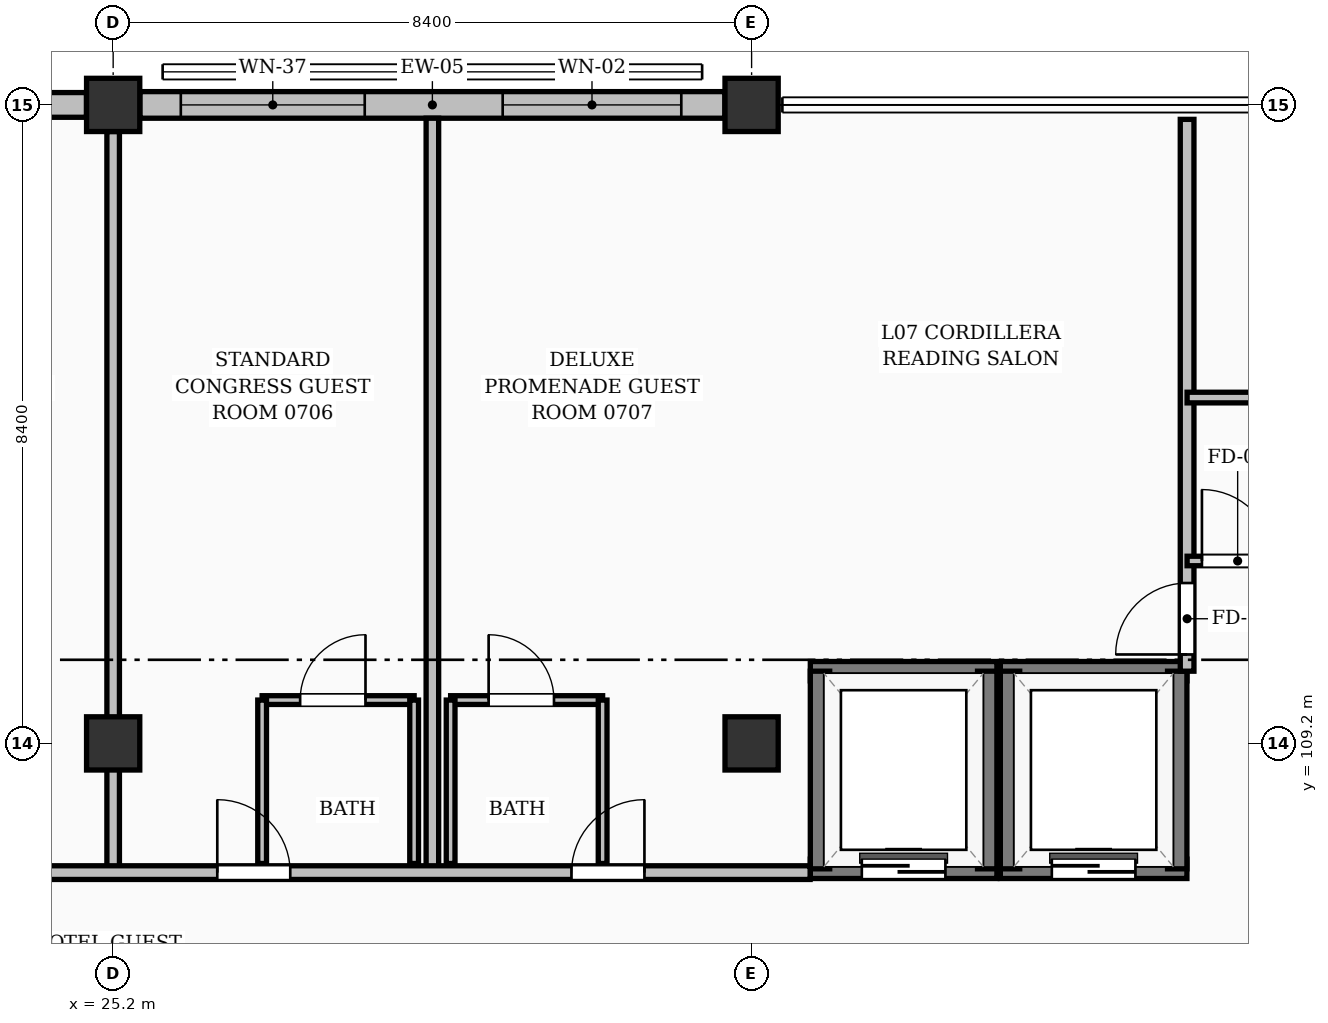
"""IFC4 building model, lengths in metres.
Left out: names, types, materials, properties, quantities, classifications, styles, units other than length and angle.
Written with IfcOpenShell. Run it as: python <this file> out.ifc"""

import sys

from ifc_helpers import new_model, si_unit, direction, frame, frame_2d, origin, origin_2d, place, context, subcontext, project, spatial, rectangle, extrude, element, fill, save


model = new_model("IFC4")
c1 = context("Model", 3, precision=1e-05, world=origin(), true_north=direction((0.0, 1.0)))
c2 = subcontext(c1, "Body", "Model", "MODEL_VIEW")
j1 = project(units=[si_unit("LENGTHUNIT", "METRE"), si_unit("PLANEANGLEUNIT", "RADIAN")], contexts=[c1])
p1 = place(None, origin())
s1 = spatial("IfcSite", under=j1, at=p1, CompositionType="ELEMENT")
p2 = place(p1, origin())
s2 = spatial("IfcBuilding", under=s1, at=p2, CompositionType="ELEMENT")
p3 = place(p2, frame((0.0, 0.0, 25.2)))
s3 = spatial("IfcBuildingStorey", under=s2, at=p3, CompositionType="ELEMENT", Elevation=25.2)
for number, where, z_axis, x_axis in (
    (1, (25.2, 109.2, 0.0), (0.0, 0.0, 1.0), (1.0, 0.0, 0.0)),
    (2, (25.2, 117.6, 0.0), (0.0, 0.0, 1.0), (1.0, 0.0, 0.0)),
    (3, (33.6, 109.2, 0.0), (0.0, 0.0, 1.0), (1.0, 0.0, 0.0)),
    (4, (33.6, 117.6, 0.0), (0.0, 0.0, 1.0), (1.0, 0.0, 0.0)),
):
    element("IfcColumn", number, at=place(p3, frame(where, z_axis=z_axis, x_axis=x_axis)), inside=s3, PredefinedType="COLUMN", context=c2, shape_type="SweptSolid", body=[
        extrude(rectangle(XDim=0.7, YDim=0.7, at=origin_2d()), origin(), (0.0, 0.0, 1.0), 3.36),
    ])
p4 = place(p3, frame((17.151, 117.6, 0.0), z_axis=(0.0, 0.0, 1.0), x_axis=(1.0, 0.0, 0.0)))
e5 = element("IfcWall", 5, at=p4, inside=s3, PredefinedType="SOLIDWALL", context=c2, shape_type="SweptSolid", body=[
    extrude(rectangle(XDim=7.698, YDim=0.325, at=frame_2d((3.849, 0.0))), origin(), (0.0, 0.0, 1.0), 2.414),
])
p5 = place(p4, frame((0.924, 0.0, 0.0)))
e6 = element("IfcOpeningElement", 6, at=p5, cuts=e5, PredefinedType="OPENING", context=c2, shape_type="SweptSolid", body=[
    extrude(rectangle(XDim=1.75, YDim=2.08, at=frame_2d((0.875, 1.04))), frame((0.0, 0.172, 0.0), z_axis=(0.0, -1.0, 0.0), x_axis=(1.0, 0.0, 0.0)), (0.0, 0.0, 1.0), 0.345),
])
p6 = place(p4, frame((4.639, 0.0, 0.25)))
e7 = element("IfcOpeningElement", 7, at=p6, cuts=e5, PredefinedType="OPENING", context=c2, shape_type="SweptSolid", body=[
    extrude(rectangle(XDim=2.32, YDim=1.9, at=frame_2d((1.16, 0.95))), frame((0.0, 0.172, 0.0), z_axis=(0.0, -1.0, 0.0), x_axis=(1.0, 0.0, 0.0)), (0.0, 0.0, 1.0), 0.345),
])
p7 = place(p3, frame((25.551, 117.6, 0.0), z_axis=(0.0, 0.0, 1.0), x_axis=(1.0, 0.0, 0.0)))
e8 = element("IfcWall", 8, at=p7, inside=s3, PredefinedType="SOLIDWALL", context=c2, shape_type="SweptSolid", body=[
    extrude(rectangle(XDim=7.698, YDim=0.35, at=frame_2d((3.849, 0.0))), origin(), (0.0, 0.0, 1.0), 2.414),
])
p8 = place(p7, frame((0.539, 0.0, 0.25)))
e9 = element("IfcOpeningElement", 9, at=p8, cuts=e8, PredefinedType="OPENING", context=c2, shape_type="SweptSolid", body=[
    extrude(rectangle(XDim=2.42, YDim=1.9, at=frame_2d((1.21, 0.95))), frame((0.0, 0.185, 0.0), z_axis=(0.0, -1.0, 0.0), x_axis=(1.0, 0.0, 0.0)), (0.0, 0.0, 1.0), 0.37),
])
p9 = place(p7, frame((4.774, 0.0, 0.25)))
e10 = element("IfcOpeningElement", 10, at=p9, cuts=e8, PredefinedType="OPENING", context=c2, shape_type="SweptSolid", body=[
    extrude(rectangle(XDim=2.35, YDim=1.85, at=frame_2d((1.175, 0.925))), frame((0.0, 0.185, 0.0), z_axis=(0.0, -1.0, 0.0), x_axis=(1.0, 0.0, 0.0)), (0.0, 0.0, 1.0), 0.37),
])
p10 = place(p3, frame((34.373, 107.55, 0.0), z_axis=(0.0, 0.0, 1.0), x_axis=(1.0, 0.0, 0.0)))
e11 = element("IfcWall", 11, at=p10, inside=s3, PredefinedType="SOLIDWALL", context=c2, shape_type="SweptSolid", body=[
    extrude(rectangle(XDim=2.455, YDim=0.255, at=frame_2d((1.228, 0.0))), origin(), (0.0, 0.0, 1.0), 3.12),
])
p11 = place(p10, frame((0.677, 0.0, 0.0)))
e12 = element("IfcOpeningElement", 12, at=p11, cuts=e11, PredefinedType="OPENING", context=c2, shape_type="SweptSolid", body=[
    extrude(rectangle(XDim=1.1, YDim=2.15, at=frame_2d((0.55, 1.075))), frame((0.0, 0.137, 0.0), z_axis=(0.0, -1.0, 0.0), x_axis=(1.0, 0.0, 0.0)), (0.0, 0.0, 1.0), 0.275),
])
p12 = place(p3, frame((34.373, 110.15, 0.0), z_axis=(0.0, 0.0, 1.0), x_axis=(1.0, 0.0, 0.0)))
e13 = element("IfcWall", 13, at=p12, inside=s3, PredefinedType="SOLIDWALL", context=c2, shape_type="SweptSolid", body=[
    extrude(rectangle(XDim=2.455, YDim=0.255, at=frame_2d((1.228, 0.0))), origin(), (0.0, 0.0, 1.0), 3.12),
])
for number, where, z_axis, x_axis in (
    (14, (34.5, 107.55, 0.0), (0.0, 0.0, 1.0), (0.0, 1.0, 0.0)),
    (15, (36.7, 107.55, 0.0), (0.0, 0.0, 1.0), (0.0, 1.0, 0.0)),
):
    element("IfcWall", number, at=place(p3, frame(where, z_axis=z_axis, x_axis=x_axis)), inside=s3, PredefinedType="SOLIDWALL", context=c2, shape_type="SweptSolid", body=[
        extrude(rectangle(XDim=2.6, YDim=0.255, at=frame_2d((1.3, 0.0))), origin(), (0.0, 0.0, 1.0), 3.12),
    ])
p13 = place(p3, frame((36.873, 107.55, 0.0), z_axis=(0.0, 0.0, 1.0), x_axis=(1.0, 0.0, 0.0)))
e16 = element("IfcWall", 16, at=p13, inside=s3, PredefinedType="SOLIDWALL", context=c2, shape_type="SweptSolid", body=[
    extrude(rectangle(XDim=2.455, YDim=0.255, at=frame_2d((1.228, 0.0))), origin(), (0.0, 0.0, 1.0), 3.12),
])
p14 = place(p13, frame((0.677, 0.0, 0.0)))
e17 = element("IfcOpeningElement", 17, at=p14, cuts=e16, PredefinedType="OPENING", context=c2, shape_type="SweptSolid", body=[
    extrude(rectangle(XDim=1.1, YDim=2.15, at=frame_2d((0.55, 1.075))), frame((0.0, 0.137, 0.0), z_axis=(0.0, -1.0, 0.0), x_axis=(1.0, 0.0, 0.0)), (0.0, 0.0, 1.0), 0.275),
])
p15 = place(p3, frame((36.873, 110.15, 0.0), z_axis=(0.0, 0.0, 1.0), x_axis=(1.0, 0.0, 0.0)))
e18 = element("IfcWall", 18, at=p15, inside=s3, PredefinedType="SOLIDWALL", context=c2, shape_type="SweptSolid", body=[
    extrude(rectangle(XDim=2.455, YDim=0.255, at=frame_2d((1.228, 0.0))), origin(), (0.0, 0.0, 1.0), 3.12),
])
for number, where, z_axis, x_axis in (
    (19, (37.0, 107.55, 0.0), (0.0, 0.0, 1.0), (0.0, 1.0, 0.0)),
    (20, (39.2, 107.55, 0.0), (0.0, 0.0, 1.0), (0.0, 1.0, 0.0)),
):
    element("IfcWall", number, at=place(p3, frame(where, z_axis=z_axis, x_axis=x_axis)), inside=s3, PredefinedType="SOLIDWALL", context=c2, shape_type="SweptSolid", body=[
        extrude(rectangle(XDim=2.6, YDim=0.255, at=frame_2d((1.3, 0.0))), origin(), (0.0, 0.0, 1.0), 3.12),
    ])
p16 = place(p3, frame((27.16, 109.77, 0.0), z_axis=(0.0, 0.0, 1.0), x_axis=(1.0, 0.0, 0.0)))
e21 = element("IfcWall", 21, at=p16, inside=s3, PredefinedType="PARTITIONING", context=c2, shape_type="SweptSolid", body=[
    extrude(rectangle(XDim=2.0, YDim=0.115, at=frame_2d((1.0, 0.0))), origin(), (0.0, 0.0, 1.0), 3.12),
])
p17 = place(p16, frame((0.5, 0.0, 0.0)))
e22 = element("IfcOpeningElement", 22, at=p17, cuts=e21, PredefinedType="OPENING", context=c2, shape_type="SweptSolid", body=[
    extrude(rectangle(XDim=0.86, YDim=2.05, at=frame_2d((0.43, 1.025))), frame((0.0, 0.067, 0.0), z_axis=(0.0, -1.0, 0.0), x_axis=(1.0, 0.0, 0.0)), (0.0, 0.0, 1.0), 0.135),
])
for number, where, z_axis, x_axis in (
    (23, (27.16, 107.62, 0.0), (0.0, 0.0, 1.0), (0.0, 1.0, 0.0)),
    (24, (29.16, 107.62, 0.0), (0.0, 0.0, 1.0), (0.0, 1.0, 0.0)),
):
    element("IfcWall", number, at=place(p3, frame(where, z_axis=z_axis, x_axis=x_axis)), inside=s3, PredefinedType="PARTITIONING", context=c2, shape_type="SweptSolid", body=[
        extrude(rectangle(XDim=2.15, YDim=0.115, at=frame_2d((1.075, 0.0))), origin(), (0.0, 0.0, 1.0), 3.12),
    ])
p18 = place(p3, frame((29.64, 109.77, 0.0), z_axis=(0.0, 0.0, 1.0), x_axis=(1.0, 0.0, 0.0)))
e25 = element("IfcWall", 25, at=p18, inside=s3, PredefinedType="PARTITIONING", context=c2, shape_type="SweptSolid", body=[
    extrude(rectangle(XDim=2.0, YDim=0.115, at=frame_2d((1.0, 0.0))), origin(), (0.0, 0.0, 1.0), 3.12),
])
p19 = place(p18, frame((0.5, 0.0, 0.0)))
e26 = element("IfcOpeningElement", 26, at=p19, cuts=e25, PredefinedType="OPENING", context=c2, shape_type="SweptSolid", body=[
    extrude(rectangle(XDim=0.86, YDim=2.05, at=frame_2d((0.43, 1.025))), frame((0.0, 0.067, 0.0), z_axis=(0.0, -1.0, 0.0), x_axis=(1.0, 0.0, 0.0)), (0.0, 0.0, 1.0), 0.135),
])
for number, where, z_axis, x_axis in (
    (27, (29.64, 107.62, 0.0), (0.0, 0.0, 1.0), (0.0, 1.0, 0.0)),
    (28, (31.64, 107.62, 0.0), (0.0, 0.0, 1.0), (0.0, 1.0, 0.0)),
):
    element("IfcWall", number, at=place(p3, frame(where, z_axis=z_axis, x_axis=x_axis)), inside=s3, PredefinedType="PARTITIONING", context=c2, shape_type="SweptSolid", body=[
        extrude(rectangle(XDim=2.15, YDim=0.115, at=frame_2d((1.075, 0.0))), origin(), (0.0, 0.0, 1.0), 3.12),
    ])
p20 = place(p3, frame((29.4, 107.5, 0.0), z_axis=(0.0, 0.0, 1.0), x_axis=(0.0, 1.0, 0.0)))
e29 = element("IfcWall", 29, at=p20, inside=s3, PredefinedType="PARTITIONING", context=c2, shape_type="SweptSolid", body=[
    extrude(rectangle(XDim=9.925, YDim=0.165, at=frame_2d((4.962, 0.0))), origin(), (0.0, 0.0, 1.0), 3.12),
])
p21 = place(p3, frame((25.2, 107.5, 0.0), z_axis=(0.0, 0.0, 1.0), x_axis=(0.0, 1.0, 0.0)))
e30 = element("IfcWall", 30, at=p21, inside=s3, PredefinedType="PARTITIONING", context=c2, shape_type="SweptSolid", body=[
    extrude(rectangle(XDim=9.75, YDim=0.165, at=frame_2d((4.875, 0.0))), origin(), (0.0, 0.0, 1.0), 2.013),
])
p22 = place(p3, frame((0.15, 107.5, 0.0), z_axis=(0.0, 0.0, 1.0), x_axis=(1.0, 0.0, 0.0)))
e31 = element("IfcWall", 31, at=p22, inside=s3, PredefinedType="PARTITIONING", context=c2, shape_type="SweptSolid", body=[
    extrude(rectangle(XDim=34.22, YDim=0.18, at=frame_2d((17.11, 0.0))), origin(), (0.0, 0.0, 1.0), 3.12),
])
p23 = place(p22, frame((1.35, 0.0, 0.0)))
e32 = element("IfcOpeningElement", 32, at=p23, cuts=e31, PredefinedType="OPENING", context=c2, shape_type="SweptSolid", body=[
    extrude(rectangle(XDim=1.02, YDim=2.15, at=frame_2d((0.51, 1.075))), frame((0.0, 0.1, 0.0), z_axis=(0.0, -1.0, 0.0), x_axis=(1.0, 0.0, 0.0)), (0.0, 0.0, 1.0), 0.2),
])
p24 = place(p22, frame((9.62, 0.0, 0.0)))
e33 = element("IfcOpeningElement", 33, at=p24, cuts=e31, PredefinedType="OPENING", context=c2, shape_type="SweptSolid", body=[
    extrude(rectangle(XDim=0.96, YDim=2.15, at=frame_2d((0.48, 1.075))), frame((0.0, 0.1, 0.0), z_axis=(0.0, -1.0, 0.0), x_axis=(1.0, 0.0, 0.0)), (0.0, 0.0, 1.0), 0.2),
])
p25 = place(p22, frame((14.28, 0.0, 0.0)))
e34 = element("IfcOpeningElement", 34, at=p25, cuts=e31, PredefinedType="OPENING", context=c2, shape_type="SweptSolid", body=[
    extrude(rectangle(XDim=0.96, YDim=2.15, at=frame_2d((0.48, 1.075))), frame((0.0, 0.1, 0.0), z_axis=(0.0, -1.0, 0.0), x_axis=(1.0, 0.0, 0.0)), (0.0, 0.0, 1.0), 0.2),
])
p26 = place(p22, frame((18.02, 0.0, 0.0)))
e35 = element("IfcOpeningElement", 35, at=p26, cuts=e31, PredefinedType="OPENING", context=c2, shape_type="SweptSolid", body=[
    extrude(rectangle(XDim=0.96, YDim=2.15, at=frame_2d((0.48, 1.075))), frame((0.0, 0.1, 0.0), z_axis=(0.0, -1.0, 0.0), x_axis=(1.0, 0.0, 0.0)), (0.0, 0.0, 1.0), 0.2),
])
p27 = place(p22, frame((22.68, 0.0, 0.0)))
e36 = element("IfcOpeningElement", 36, at=p27, cuts=e31, PredefinedType="OPENING", context=c2, shape_type="SweptSolid", body=[
    extrude(rectangle(XDim=0.96, YDim=2.15, at=frame_2d((0.48, 1.075))), frame((0.0, 0.1, 0.0), z_axis=(0.0, -1.0, 0.0), x_axis=(1.0, 0.0, 0.0)), (0.0, 0.0, 1.0), 0.2),
])
p28 = place(p22, frame((26.42, 0.0, 0.0)))
e37 = element("IfcOpeningElement", 37, at=p28, cuts=e31, PredefinedType="OPENING", context=c2, shape_type="SweptSolid", body=[
    extrude(rectangle(XDim=0.96, YDim=2.15, at=frame_2d((0.48, 1.075))), frame((0.0, 0.1, 0.0), z_axis=(0.0, -1.0, 0.0), x_axis=(1.0, 0.0, 0.0)), (0.0, 0.0, 1.0), 0.2),
])
p29 = place(p22, frame((31.08, 0.0, 0.0)))
e38 = element("IfcOpeningElement", 38, at=p29, cuts=e31, PredefinedType="OPENING", context=c2, shape_type="SweptSolid", body=[
    extrude(rectangle(XDim=0.96, YDim=2.15, at=frame_2d((0.48, 1.075))), frame((0.0, 0.1, 0.0), z_axis=(0.0, -1.0, 0.0), x_axis=(1.0, 0.0, 0.0)), (0.0, 0.0, 1.0), 0.2),
])
p30 = place(p3, frame((39.33, 110.15, 0.0), z_axis=(0.0, 0.0, 1.0), x_axis=(0.0, 1.0, 0.0)))
e39 = element("IfcWall", 39, at=p30, inside=s3, PredefinedType="PARTITIONING", context=c2, shape_type="SweptSolid", body=[
    extrude(rectangle(XDim=7.26, YDim=0.18, at=frame_2d((3.63, 0.0))), origin(), (0.0, 0.0, 1.0), 3.12),
])
p31 = place(p30, frame((0.22, 0.0, 0.0)))
e40 = element("IfcOpeningElement", 40, at=p31, cuts=e39, PredefinedType="OPENING", context=c2, shape_type="SweptSolid", body=[
    extrude(rectangle(XDim=0.94, YDim=2.1, at=frame_2d((0.47, 1.05))), frame((0.0, 0.1, 0.0), z_axis=(0.0, -1.0, 0.0), x_axis=(1.0, 0.0, 0.0)), (0.0, 0.0, 1.0), 0.2),
])
p32 = place(p3, frame((39.33, 111.6, 0.0), z_axis=(0.0, 0.0, 1.0), x_axis=(1.0, 0.0, 0.0)))
e41 = element("IfcWall", 41, at=p32, inside=s3, PredefinedType="PARTITIONING", context=c2, shape_type="SweptSolid", body=[
    extrude(rectangle(XDim=1.33, YDim=0.125, at=frame_2d((0.665, 0.0))), origin(), (0.0, 0.0, 1.0), 3.12),
])
p33 = place(p32, frame((0.195, 0.0, 0.0)))
e42 = element("IfcOpeningElement", 42, at=p33, cuts=e41, PredefinedType="OPENING", context=c2, shape_type="SweptSolid", body=[
    extrude(rectangle(XDim=0.94, YDim=2.1, at=frame_2d((0.47, 1.05))), frame((0.0, 0.073, 0.0), z_axis=(0.0, -1.0, 0.0), x_axis=(1.0, 0.0, 0.0)), (0.0, 0.0, 1.0), 0.145),
])
p34 = place(p3, frame((39.33, 113.75, 0.0), z_axis=(0.0, 0.0, 1.0), x_axis=(1.0, 0.0, 0.0)))
e43 = element("IfcWall", 43, at=p34, inside=s3, PredefinedType="PARTITIONING", context=c2, shape_type="SweptSolid", body=[
    extrude(rectangle(XDim=2.67, YDim=0.14, at=frame_2d((1.335, 0.0))), origin(), (0.0, 0.0, 1.0), 3.12),
])
p35 = place(p8, origin())
e44 = element("IfcWindow", 44, at=p35, inside=s3, PartitioningType="DOUBLE_PANEL_VERTICAL", PredefinedType="WINDOW", context=c2, shape_type="SweptSolid", body=[
    extrude(rectangle(XDim=2.42, YDim=1.9, at=frame_2d((1.21, 0.95))), frame((0.0, 0.03, 0.0), z_axis=(0.0, -1.0, 0.0), x_axis=(1.0, 0.0, 0.0)), (0.0, 0.0, 1.0), 0.06),
])
fill(e9, e44)
p36 = place(p9, origin())
e45 = element("IfcWindow", 45, at=p36, inside=s3, PartitioningType="DOUBLE_PANEL_VERTICAL", PredefinedType="WINDOW", context=c2, shape_type="SweptSolid", body=[
    extrude(rectangle(XDim=2.35, YDim=1.85, at=frame_2d((1.175, 0.925))), frame((0.0, 0.03, 0.0), z_axis=(0.0, -1.0, 0.0), x_axis=(1.0, 0.0, 0.0)), (0.0, 0.0, 1.0), 0.06),
])
fill(e10, e45)
p37 = place(p11, origin())
e46 = element("IfcDoor", 46, at=p37, inside=s3, OperationType="DOUBLE_DOOR_SLIDING", PredefinedType="DOOR", context=c2, shape_type="SweptSolid", body=[
    extrude(rectangle(XDim=1.1, YDim=2.15, at=frame_2d((0.55, 1.075))), frame((0.0, 0.025, 0.0), z_axis=(0.0, -1.0, 0.0), x_axis=(1.0, 0.0, 0.0)), (0.0, 0.0, 1.0), 0.05),
])
fill(e12, e46)
p38 = place(p14, origin())
e47 = element("IfcDoor", 47, at=p38, inside=s3, OperationType="DOUBLE_DOOR_SLIDING", PredefinedType="DOOR", context=c2, shape_type="SweptSolid", body=[
    extrude(rectangle(XDim=1.1, YDim=2.15, at=frame_2d((0.55, 1.075))), frame((0.0, 0.025, 0.0), z_axis=(0.0, -1.0, 0.0), x_axis=(1.0, 0.0, 0.0)), (0.0, 0.0, 1.0), 0.05),
])
fill(e17, e47)
p39 = place(p17, origin())
e48 = element("IfcDoor", 48, at=p39, inside=s3, OperationType="SINGLE_SWING_RIGHT", PredefinedType="DOOR", context=c2, shape_type="SweptSolid", body=[
    extrude(rectangle(XDim=0.86, YDim=2.05, at=frame_2d((0.43, 1.025))), frame((0.0, 0.025, 0.0), z_axis=(0.0, -1.0, 0.0), x_axis=(1.0, 0.0, 0.0)), (0.0, 0.0, 1.0), 0.05),
])
fill(e22, e48)
p40 = place(p19, origin())
e49 = element("IfcDoor", 49, at=p40, inside=s3, OperationType="SINGLE_SWING_LEFT", PredefinedType="DOOR", context=c2, shape_type="SweptSolid", body=[
    extrude(rectangle(XDim=0.86, YDim=2.05, at=frame_2d((0.43, 1.025))), frame((0.0, 0.025, 0.0), z_axis=(0.0, -1.0, 0.0), x_axis=(1.0, 0.0, 0.0)), (0.0, 0.0, 1.0), 0.05),
])
fill(e26, e49)
p41 = place(p28, origin())
e50 = element("IfcDoor", 50, at=p41, inside=s3, OperationType="SINGLE_SWING_LEFT", PredefinedType="DOOR", context=c2, shape_type="SweptSolid", body=[
    extrude(rectangle(XDim=0.96, YDim=2.15, at=frame_2d((0.48, 1.075))), frame((0.0, 0.025, 0.0), z_axis=(0.0, -1.0, 0.0), x_axis=(1.0, 0.0, 0.0)), (0.0, 0.0, 1.0), 0.05),
])
fill(e37, e50)
p42 = place(p29, origin())
e51 = element("IfcDoor", 51, at=p42, inside=s3, OperationType="SINGLE_SWING_RIGHT", PredefinedType="DOOR", context=c2, shape_type="SweptSolid", body=[
    extrude(rectangle(XDim=0.96, YDim=2.15, at=frame_2d((0.48, 1.075))), frame((0.0, 0.025, 0.0), z_axis=(0.0, -1.0, 0.0), x_axis=(1.0, 0.0, 0.0)), (0.0, 0.0, 1.0), 0.05),
])
fill(e38, e51)
p43 = place(p31, origin())
e52 = element("IfcDoor", 52, at=p43, inside=s3, OperationType="SINGLE_SWING_LEFT", PredefinedType="DOOR", context=c2, shape_type="SweptSolid", body=[
    extrude(rectangle(XDim=0.94, YDim=2.1, at=frame_2d((0.47, 1.05))), frame((0.0, 0.025, 0.0), z_axis=(0.0, -1.0, 0.0), x_axis=(1.0, 0.0, 0.0)), (0.0, 0.0, 1.0), 0.05),
])
fill(e40, e52)
p44 = place(p33, origin())
e53 = element("IfcDoor", 53, at=p44, inside=s3, OperationType="SINGLE_SWING_LEFT", PredefinedType="DOOR", context=c2, shape_type="SweptSolid", body=[
    extrude(rectangle(XDim=0.94, YDim=2.1, at=frame_2d((0.47, 1.05))), frame((0.0, 0.025, 0.0), z_axis=(0.0, -1.0, 0.0), x_axis=(1.0, 0.0, 0.0)), (0.0, 0.0, 1.0), 0.05),
])
fill(e42, e53)
save(model, sys.argv[1])
